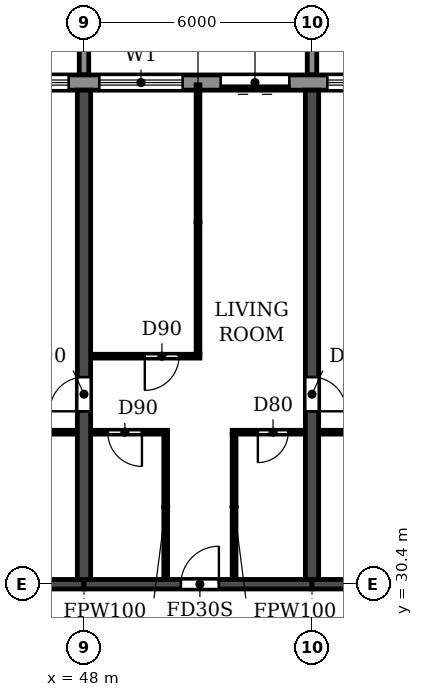
"""IFC4 building model, lengths in metres.
Left out: names, types, materials, properties, quantities, classifications, styles, units other than length and angle.
Written with IfcOpenShell. Run it as: python <this file> out.ifc"""

import sys

from ifc_helpers import new_model, si_unit, direction, frame, frame_2d, origin, place, context, subcontext, project, spatial, polyline, rectangle, outline, extrude, source, transform, mapped, element, fill, save


model = new_model("IFC4")
c1 = context("Model", 3, precision=1e-05, world=origin(), true_north=direction((0.0, 1.0)))
c2 = subcontext(c1, "Body", "Model", "MODEL_VIEW")
j1 = project(units=[si_unit("LENGTHUNIT", "METRE"), si_unit("PLANEANGLEUNIT", "RADIAN")], contexts=[c1])
p1 = place(None, origin())
s1 = spatial("IfcSite", under=j1, at=p1, CompositionType="ELEMENT")
p2 = place(p1, origin())
s2 = spatial("IfcBuilding", under=s1, at=p2, CompositionType="ELEMENT")
p3 = place(p2, frame((0.0, 0.0, 82.8)))
s3 = spatial("IfcBuildingStorey", under=s2, at=p3, CompositionType="ELEMENT", Elevation=82.8)
p4 = place(p3, frame((48.0, 30.525, 0.0), z_axis=(0.0, 0.0, 1.0), x_axis=(0.0, 1.0, 0.0)))
e1 = element("IfcWall", 1, at=p4, inside=s3, PredefinedType="SHEAR", context=c2, shape_type="SweptSolid", body=[
    extrude(rectangle(XDim=12.875, YDim=0.35, at=frame_2d((6.438, 0.0))), origin(), (0.0, 0.0, 1.0), 3.06),
])
p5 = place(p4, frame((4.425, 0.0, 0.0)))
e2 = element("IfcOpeningElement", 2, at=p5, cuts=e1, PredefinedType="OPENING", context=c2, shape_type="SweptSolid", body=[
    extrude(rectangle(XDim=0.9, YDim=2.1, at=frame_2d((0.45, 1.05))), frame((0.0, 0.185, 0.0), z_axis=(0.0, -1.0, 0.0), x_axis=(1.0, 0.0, 0.0)), (0.0, 0.0, 1.0), 0.37),
])
p6 = place(p3, frame((54.0, 30.525, 0.0), z_axis=(0.0, 0.0, 1.0), x_axis=(0.0, 1.0, 0.0)))
e3 = element("IfcWall", 3, at=p6, inside=s3, PredefinedType="SHEAR", context=c2, shape_type="SweptSolid", body=[
    extrude(rectangle(XDim=12.875, YDim=0.35, at=frame_2d((6.438, 0.0))), origin(), (0.0, 0.0, 1.0), 3.06),
])
p7 = place(p6, frame((4.425, 0.0, 0.0)))
e4 = element("IfcOpeningElement", 4, at=p7, cuts=e3, PredefinedType="OPENING", context=c2, shape_type="SweptSolid", body=[
    extrude(rectangle(XDim=0.9, YDim=2.1, at=frame_2d((0.45, 1.05))), frame((0.0, 0.185, 0.0), z_axis=(0.0, -1.0, 0.0), x_axis=(1.0, 0.0, 0.0)), (0.0, 0.0, 1.0), 0.37),
])
p8 = place(p3, frame((42.0, 30.4, 0.0), z_axis=(0.0, 0.0, 1.0), x_axis=(1.0, 0.0, 0.0)))
e5 = element("IfcWall", 5, at=p8, inside=s3, PredefinedType="SHEAR", context=c2, shape_type="SweptSolid", body=[
    extrude(rectangle(XDim=6.0, YDim=0.25, at=frame_2d((3.0, 0.0))), origin(), (0.0, 0.0, 1.0), 2.46),
])
p9 = place(p3, frame((48.0, 30.4, 0.0), z_axis=(0.0, 0.0, 1.0), x_axis=(1.0, 0.0, 0.0)))
e6 = element("IfcWall", 6, at=p9, inside=s3, PredefinedType="SHEAR", context=c2, shape_type="SweptSolid", body=[
    extrude(rectangle(XDim=6.0, YDim=0.25, at=frame_2d((3.0, 0.0))), origin(), (0.0, 0.0, 1.0), 2.46),
])
p10 = place(p9, frame((2.55, 0.0, 0.0)))
e7 = element("IfcOpeningElement", 7, at=p10, cuts=e6, PredefinedType="OPENING", context=c2, shape_type="SweptSolid", body=[
    extrude(rectangle(XDim=1.0, YDim=2.1, at=frame_2d((0.5, 1.05))), frame((0.0, 0.135, 0.0), z_axis=(0.0, -1.0, 0.0), x_axis=(1.0, 0.0, 0.0)), (0.0, 0.0, 1.0), 0.27),
])
p11 = place(p3, frame((54.0, 30.4, 0.0), z_axis=(0.0, 0.0, 1.0), x_axis=(1.0, 0.0, 0.0)))
e8 = element("IfcWall", 8, at=p11, inside=s3, PredefinedType="SHEAR", context=c2, shape_type="SweptSolid", body=[
    extrude(rectangle(XDim=6.0, YDim=0.25, at=frame_2d((3.0, 0.0))), origin(), (0.0, 0.0, 1.0), 2.46),
])
p12 = place(p3, frame((91.317, 43.6, 0.0), z_axis=(0.0, 0.0, 1.0), x_axis=(-1.0, 0.0, 0.0)))
e9 = element("IfcWall", 9, at=p12, inside=s3, PredefinedType="STANDARD", context=c2, shape_type="SweptSolid", body=[
    extrude(rectangle(XDim=80.634, YDim=0.4, at=frame_2d((40.317, 0.0))), origin(), (0.0, 0.0, 1.0), 3.06),
])
p13 = place(p12, frame((76.717, 0.0, 0.9)))
e10 = element("IfcOpeningElement", 10, at=p13, cuts=e9, PredefinedType="OPENING", context=c2, shape_type="SweptSolid", body=[
    extrude(rectangle(XDim=2.2, YDim=1.5, at=frame_2d((1.1, 0.75))), frame((0.0, 0.21, 0.0), z_axis=(0.0, -1.0, 0.0), x_axis=(1.0, 0.0, 0.0)), (0.0, 0.0, 1.0), 0.42),
])
p14 = place(p12, frame((73.917, 0.0, 0.0)))
e11 = element("IfcOpeningElement", 11, at=p14, cuts=e9, PredefinedType="OPENING", context=c2, shape_type="SweptSolid", body=[
    extrude(rectangle(XDim=1.8, YDim=2.4, at=frame_2d((0.9, 1.2))), frame((0.0, 0.21, 0.0), z_axis=(0.0, -1.0, 0.0), x_axis=(1.0, 0.0, 0.0)), (0.0, 0.0, 1.0), 0.42),
])
p15 = place(p12, frame((70.717, 0.0, 0.9)))
e12 = element("IfcOpeningElement", 12, at=p15, cuts=e9, PredefinedType="OPENING", context=c2, shape_type="SweptSolid", body=[
    extrude(rectangle(XDim=2.2, YDim=1.5, at=frame_2d((1.1, 0.75))), frame((0.0, 0.21, 0.0), z_axis=(0.0, -1.0, 0.0), x_axis=(1.0, 0.0, 0.0)), (0.0, 0.0, 1.0), 0.42),
])
p16 = place(p12, frame((67.717, 0.0, 0.9)))
e13 = element("IfcOpeningElement", 13, at=p16, cuts=e9, PredefinedType="OPENING", context=c2, shape_type="SweptSolid", body=[
    extrude(rectangle(XDim=2.2, YDim=1.5, at=frame_2d((1.1, 0.75))), frame((0.0, 0.21, 0.0), z_axis=(0.0, -1.0, 0.0), x_axis=(1.0, 0.0, 0.0)), (0.0, 0.0, 1.0), 0.42),
])
p17 = place(p12, frame((64.717, 0.0, 0.9)))
e14 = element("IfcOpeningElement", 14, at=p17, cuts=e9, PredefinedType="OPENING", context=c2, shape_type="SweptSolid", body=[
    extrude(rectangle(XDim=2.2, YDim=1.5, at=frame_2d((1.1, 0.75))), frame((0.0, 0.21, 0.0), z_axis=(0.0, -1.0, 0.0), x_axis=(1.0, 0.0, 0.0)), (0.0, 0.0, 1.0), 0.42),
])
p18 = place(p12, frame((61.917, 0.0, 0.0)))
e15 = element("IfcOpeningElement", 15, at=p18, cuts=e9, PredefinedType="OPENING", context=c2, shape_type="SweptSolid", body=[
    extrude(rectangle(XDim=1.8, YDim=2.4, at=frame_2d((0.9, 1.2))), frame((0.0, 0.21, 0.0), z_axis=(0.0, -1.0, 0.0), x_axis=(1.0, 0.0, 0.0)), (0.0, 0.0, 1.0), 0.42),
])
p19 = place(p12, frame((58.917, 0.0, 0.0)))
e16 = element("IfcOpeningElement", 16, at=p19, cuts=e9, PredefinedType="OPENING", context=c2, shape_type="SweptSolid", body=[
    extrude(rectangle(XDim=1.8, YDim=2.4, at=frame_2d((0.9, 1.2))), frame((0.0, 0.21, 0.0), z_axis=(0.0, -1.0, 0.0), x_axis=(1.0, 0.0, 0.0)), (0.0, 0.0, 1.0), 0.42),
])
p20 = place(p12, frame((55.717, 0.0, 0.9)))
e17 = element("IfcOpeningElement", 17, at=p20, cuts=e9, PredefinedType="OPENING", context=c2, shape_type="SweptSolid", body=[
    extrude(rectangle(XDim=2.2, YDim=1.5, at=frame_2d((1.1, 0.75))), frame((0.0, 0.21, 0.0), z_axis=(0.0, -1.0, 0.0), x_axis=(1.0, 0.0, 0.0)), (0.0, 0.0, 1.0), 0.42),
])
p21 = place(p12, frame((52.717, 0.0, 0.9)))
e18 = element("IfcOpeningElement", 18, at=p21, cuts=e9, PredefinedType="OPENING", context=c2, shape_type="SweptSolid", body=[
    extrude(rectangle(XDim=2.2, YDim=1.5, at=frame_2d((1.1, 0.75))), frame((0.0, 0.21, 0.0), z_axis=(0.0, -1.0, 0.0), x_axis=(1.0, 0.0, 0.0)), (0.0, 0.0, 1.0), 0.42),
])
p22 = place(p12, frame((49.917, 0.0, 0.0)))
e19 = element("IfcOpeningElement", 19, at=p22, cuts=e9, PredefinedType="OPENING", context=c2, shape_type="SweptSolid", body=[
    extrude(rectangle(XDim=1.8, YDim=2.4, at=frame_2d((0.9, 1.2))), frame((0.0, 0.21, 0.0), z_axis=(0.0, -1.0, 0.0), x_axis=(1.0, 0.0, 0.0)), (0.0, 0.0, 1.0), 0.42),
])
p23 = place(p12, frame((46.717, 0.0, 0.9)))
e20 = element("IfcOpeningElement", 20, at=p23, cuts=e9, PredefinedType="OPENING", context=c2, shape_type="SweptSolid", body=[
    extrude(rectangle(XDim=2.2, YDim=1.5, at=frame_2d((1.1, 0.75))), frame((0.0, 0.21, 0.0), z_axis=(0.0, -1.0, 0.0), x_axis=(1.0, 0.0, 0.0)), (0.0, 0.0, 1.0), 0.42),
])
p24 = place(p12, frame((43.717, 0.0, 0.9)))
e21 = element("IfcOpeningElement", 21, at=p24, cuts=e9, PredefinedType="OPENING", context=c2, shape_type="SweptSolid", body=[
    extrude(rectangle(XDim=2.2, YDim=1.5, at=frame_2d((1.1, 0.75))), frame((0.0, 0.21, 0.0), z_axis=(0.0, -1.0, 0.0), x_axis=(1.0, 0.0, 0.0)), (0.0, 0.0, 1.0), 0.42),
])
p25 = place(p12, frame((40.717, 0.0, 0.9)))
e22 = element("IfcOpeningElement", 22, at=p25, cuts=e9, PredefinedType="OPENING", context=c2, shape_type="SweptSolid", body=[
    extrude(rectangle(XDim=2.2, YDim=1.5, at=frame_2d((1.1, 0.75))), frame((0.0, 0.21, 0.0), z_axis=(0.0, -1.0, 0.0), x_axis=(1.0, 0.0, 0.0)), (0.0, 0.0, 1.0), 0.42),
])
p26 = place(p12, frame((37.917, 0.0, 0.0)))
e23 = element("IfcOpeningElement", 23, at=p26, cuts=e9, PredefinedType="OPENING", context=c2, shape_type="SweptSolid", body=[
    extrude(rectangle(XDim=1.8, YDim=2.4, at=frame_2d((0.9, 1.2))), frame((0.0, 0.21, 0.0), z_axis=(0.0, -1.0, 0.0), x_axis=(1.0, 0.0, 0.0)), (0.0, 0.0, 1.0), 0.42),
])
p27 = place(p12, frame((34.717, 0.0, 0.9)))
e24 = element("IfcOpeningElement", 24, at=p27, cuts=e9, PredefinedType="OPENING", context=c2, shape_type="SweptSolid", body=[
    extrude(rectangle(XDim=2.2, YDim=1.5, at=frame_2d((1.1, 0.75))), frame((0.0, 0.21, 0.0), z_axis=(0.0, -1.0, 0.0), x_axis=(1.0, 0.0, 0.0)), (0.0, 0.0, 1.0), 0.42),
])
p28 = place(p12, frame((31.717, 0.0, 0.9)))
e25 = element("IfcOpeningElement", 25, at=p28, cuts=e9, PredefinedType="OPENING", context=c2, shape_type="SweptSolid", body=[
    extrude(rectangle(XDim=2.2, YDim=1.5, at=frame_2d((1.1, 0.75))), frame((0.0, 0.21, 0.0), z_axis=(0.0, -1.0, 0.0), x_axis=(1.0, 0.0, 0.0)), (0.0, 0.0, 1.0), 0.42),
])
p29 = place(p12, frame((28.917, 0.0, 0.0)))
e26 = element("IfcOpeningElement", 26, at=p29, cuts=e9, PredefinedType="OPENING", context=c2, shape_type="SweptSolid", body=[
    extrude(rectangle(XDim=1.8, YDim=2.4, at=frame_2d((0.9, 1.2))), frame((0.0, 0.21, 0.0), z_axis=(0.0, -1.0, 0.0), x_axis=(1.0, 0.0, 0.0)), (0.0, 0.0, 1.0), 0.42),
])
p30 = place(p12, frame((25.717, 0.0, 0.9)))
e27 = element("IfcOpeningElement", 27, at=p30, cuts=e9, PredefinedType="OPENING", context=c2, shape_type="SweptSolid", body=[
    extrude(rectangle(XDim=2.2, YDim=1.5, at=frame_2d((1.1, 0.75))), frame((0.0, 0.21, 0.0), z_axis=(0.0, -1.0, 0.0), x_axis=(1.0, 0.0, 0.0)), (0.0, 0.0, 1.0), 0.42),
])
p31 = place(p12, frame((22.717, 0.0, 0.9)))
e28 = element("IfcOpeningElement", 28, at=p31, cuts=e9, PredefinedType="OPENING", context=c2, shape_type="SweptSolid", body=[
    extrude(rectangle(XDim=2.2, YDim=1.5, at=frame_2d((1.1, 0.75))), frame((0.0, 0.21, 0.0), z_axis=(0.0, -1.0, 0.0), x_axis=(1.0, 0.0, 0.0)), (0.0, 0.0, 1.0), 0.42),
])
p32 = place(p12, frame((19.717, 0.0, 0.9)))
e29 = element("IfcOpeningElement", 29, at=p32, cuts=e9, PredefinedType="OPENING", context=c2, shape_type="SweptSolid", body=[
    extrude(rectangle(XDim=2.2, YDim=1.5, at=frame_2d((1.1, 0.75))), frame((0.0, 0.21, 0.0), z_axis=(0.0, -1.0, 0.0), x_axis=(1.0, 0.0, 0.0)), (0.0, 0.0, 1.0), 0.42),
])
p33 = place(p12, frame((16.717, 0.0, 0.9)))
e30 = element("IfcOpeningElement", 30, at=p33, cuts=e9, PredefinedType="OPENING", context=c2, shape_type="SweptSolid", body=[
    extrude(rectangle(XDim=2.2, YDim=1.5, at=frame_2d((1.1, 0.75))), frame((0.0, 0.21, 0.0), z_axis=(0.0, -1.0, 0.0), x_axis=(1.0, 0.0, 0.0)), (0.0, 0.0, 1.0), 0.42),
])
p34 = place(p12, frame((13.917, 0.0, 0.0)))
e31 = element("IfcOpeningElement", 31, at=p34, cuts=e9, PredefinedType="OPENING", context=c2, shape_type="SweptSolid", body=[
    extrude(rectangle(XDim=1.8, YDim=2.4, at=frame_2d((0.9, 1.2))), frame((0.0, 0.21, 0.0), z_axis=(0.0, -1.0, 0.0), x_axis=(1.0, 0.0, 0.0)), (0.0, 0.0, 1.0), 0.42),
])
p35 = place(p12, frame((10.717, 0.0, 0.9)))
e32 = element("IfcOpeningElement", 32, at=p35, cuts=e9, PredefinedType="OPENING", context=c2, shape_type="SweptSolid", body=[
    extrude(rectangle(XDim=2.2, YDim=1.5, at=frame_2d((1.1, 0.75))), frame((0.0, 0.21, 0.0), z_axis=(0.0, -1.0, 0.0), x_axis=(1.0, 0.0, 0.0)), (0.0, 0.0, 1.0), 0.42),
])
p36 = place(p12, frame((7.717, 0.0, 0.9)))
e33 = element("IfcOpeningElement", 33, at=p36, cuts=e9, PredefinedType="OPENING", context=c2, shape_type="SweptSolid", body=[
    extrude(rectangle(XDim=2.2, YDim=1.5, at=frame_2d((1.1, 0.75))), frame((0.0, 0.21, 0.0), z_axis=(0.0, -1.0, 0.0), x_axis=(1.0, 0.0, 0.0)), (0.0, 0.0, 1.0), 0.42),
])
p37 = place(p12, frame((4.917, 0.0, 0.0)))
e34 = element("IfcOpeningElement", 34, at=p37, cuts=e9, PredefinedType="OPENING", context=c2, shape_type="SweptSolid", body=[
    extrude(rectangle(XDim=1.8, YDim=2.4, at=frame_2d((0.9, 1.2))), frame((0.0, 0.21, 0.0), z_axis=(0.0, -1.0, 0.0), x_axis=(1.0, 0.0, 0.0)), (0.0, 0.0, 1.0), 0.42),
])
p38 = place(p12, frame((1.717, 0.0, 0.9)))
e35 = element("IfcOpeningElement", 35, at=p38, cuts=e9, PredefinedType="OPENING", context=c2, shape_type="SweptSolid", body=[
    extrude(rectangle(XDim=2.2, YDim=1.5, at=frame_2d((1.1, 0.75))), frame((0.0, 0.21, 0.0), z_axis=(0.0, -1.0, 0.0), x_axis=(1.0, 0.0, 0.0)), (0.0, 0.0, 1.0), 0.42),
])
m1 = source(origin(), c2, "Body", "SweptSolid", [
    extrude(outline(polyline([(0.0, 0.0), (0.25, 0.0), (0.25, 3.1), (0.0, 3.1), (0.0, 0.0)])), origin(), (0.0, 0.0, 1.0), 3.1),
])
for number, where in (
    (36, (47.875, 43.8, 0.0)),
    (37, (53.875, 43.8, 0.0)),
):
    element("IfcWall", number, at=place(p3, frame(where)), inside=s3, PredefinedType="STANDARD", context=c2, shape_type="MappedRepresentation", body=[
        mapped(m1, transform((0.0, 0.0, 0.0))),
    ])
p39 = place(p3, frame((45.1, 34.4, 0.0), z_axis=(0.0, 0.0, 1.0), x_axis=(1.0, 0.0, 0.0)))
e38 = element("IfcWall", 38, at=p39, inside=s3, PredefinedType="PARTITIONING", context=c2, shape_type="SweptSolid", body=[
    extrude(rectangle(XDim=2.715, YDim=0.1, at=frame_2d((1.357, 0.0))), origin(), (0.0, 0.0, 1.0), 3.06),
])
p40 = place(p39, frame((1.0, 0.0, 0.0)))
e39 = element("IfcOpeningElement", 39, at=p40, cuts=e38, PredefinedType="OPENING", context=c2, shape_type="SweptSolid", body=[
    extrude(rectangle(XDim=0.8, YDim=2.1, at=frame_2d((0.4, 1.05))), frame((0.0, 0.06, 0.0), z_axis=(0.0, -1.0, 0.0), x_axis=(1.0, 0.0, 0.0)), (0.0, 0.0, 1.0), 0.12),
])
p41 = place(p3, frame((48.185, 34.4, 0.0), z_axis=(0.0, 0.0, 1.0), x_axis=(1.0, 0.0, 0.0)))
e40 = element("IfcWall", 40, at=p41, inside=s3, PredefinedType="PARTITIONING", context=c2, shape_type="SweptSolid", body=[
    extrude(rectangle(XDim=2.015, YDim=0.1, at=frame_2d((1.007, 0.0))), origin(), (0.0, 0.0, 1.0), 3.06),
])
p42 = place(p41, frame((0.44, 0.0, 0.0)))
e41 = element("IfcOpeningElement", 41, at=p42, cuts=e40, PredefinedType="OPENING", context=c2, shape_type="SweptSolid", body=[
    extrude(rectangle(XDim=0.9, YDim=2.1, at=frame_2d((0.45, 1.05))), frame((0.0, 0.06, 0.0), z_axis=(0.0, -1.0, 0.0), x_axis=(1.0, 0.0, 0.0)), (0.0, 0.0, 1.0), 0.12),
])
p43 = place(p3, frame((51.9, 34.4, 0.0), z_axis=(0.0, 0.0, 1.0), x_axis=(1.0, 0.0, 0.0)))
e42 = element("IfcWall", 42, at=p43, inside=s3, PredefinedType="PARTITIONING", context=c2, shape_type="SweptSolid", body=[
    extrude(rectangle(XDim=1.915, YDim=0.1, at=frame_2d((0.958, 0.0))), origin(), (0.0, 0.0, 1.0), 3.06),
])
p44 = place(p43, frame((0.675, 0.0, 0.0)))
e43 = element("IfcOpeningElement", 43, at=p44, cuts=e42, PredefinedType="OPENING", context=c2, shape_type="SweptSolid", body=[
    extrude(rectangle(XDim=0.8, YDim=2.1, at=frame_2d((0.4, 1.05))), frame((0.0, 0.06, 0.0), z_axis=(0.0, -1.0, 0.0), x_axis=(1.0, 0.0, 0.0)), (0.0, 0.0, 1.0), 0.12),
])
p45 = place(p3, frame((54.185, 34.4, 0.0), z_axis=(0.0, 0.0, 1.0), x_axis=(1.0, 0.0, 0.0)))
e44 = element("IfcWall", 44, at=p45, inside=s3, PredefinedType="PARTITIONING", context=c2, shape_type="SweptSolid", body=[
    extrude(rectangle(XDim=2.715, YDim=0.1, at=frame_2d((1.357, 0.0))), origin(), (0.0, 0.0, 1.0), 3.06),
])
p46 = place(p45, frame((0.915, 0.0, 0.0)))
e45 = element("IfcOpeningElement", 45, at=p46, cuts=e44, PredefinedType="OPENING", context=c2, shape_type="SweptSolid", body=[
    extrude(rectangle(XDim=0.8, YDim=2.1, at=frame_2d((0.4, 1.05))), frame((0.0, 0.06, 0.0), z_axis=(0.0, -1.0, 0.0), x_axis=(1.0, 0.0, 0.0)), (0.0, 0.0, 1.0), 0.12),
])
p47 = place(p3, frame((48.185, 36.4, 0.0), z_axis=(0.0, 0.0, 1.0), x_axis=(1.0, 0.0, 0.0)))
e46 = element("IfcWall", 46, at=p47, inside=s3, PredefinedType="PARTITIONING", context=c2, shape_type="SweptSolid", body=[
    extrude(rectangle(XDim=2.865, YDim=0.1, at=frame_2d((1.433, 0.0))), origin(), (0.0, 0.0, 1.0), 3.06),
])
p48 = place(p47, frame((1.415, 0.0, 0.0)))
e47 = element("IfcOpeningElement", 47, at=p48, cuts=e46, PredefinedType="OPENING", context=c2, shape_type="SweptSolid", body=[
    extrude(rectangle(XDim=0.9, YDim=2.1, at=frame_2d((0.45, 1.05))), frame((0.0, 0.06, 0.0), z_axis=(0.0, -1.0, 0.0), x_axis=(1.0, 0.0, 0.0)), (0.0, 0.0, 1.0), 0.12),
])
p49 = place(p3, frame((50.15, 30.535, 0.0), z_axis=(0.0, 0.0, 1.0), x_axis=(0.0, 1.0, 0.0)))
e48 = element("IfcWall", 48, at=p49, inside=s3, PredefinedType="PARTITIONING", context=c2, shape_type="SweptSolid", body=[
    extrude(rectangle(XDim=3.815, YDim=0.1, at=frame_2d((1.908, 0.0))), origin(), (0.0, 0.0, 1.0), 3.06),
])
p50 = place(p3, frame((51.0, 36.45, 0.0), z_axis=(0.0, 0.0, 1.0), x_axis=(0.0, 1.0, 0.0)))
e49 = element("IfcWall", 49, at=p50, inside=s3, PredefinedType="PARTITIONING", context=c2, shape_type="SweptSolid", body=[
    extrude(rectangle(XDim=7.09, YDim=0.1, at=frame_2d((3.545, 0.0))), origin(), (0.0, 0.0, 1.0), 3.06),
])
p51 = place(p3, frame((51.95, 30.535, 0.0), z_axis=(0.0, 0.0, 1.0), x_axis=(0.0, 1.0, 0.0)))
e50 = element("IfcWall", 50, at=p51, inside=s3, PredefinedType="PARTITIONING", context=c2, shape_type="SweptSolid", body=[
    extrude(rectangle(XDim=3.815, YDim=0.1, at=frame_2d((1.908, 0.0))), origin(), (0.0, 0.0, 1.0), 3.06),
])
p52 = place(p24, origin())
e51 = element("IfcWindow", 51, at=p52, inside=s3, PartitioningType="DOUBLE_PANEL_HORIZONTAL", PredefinedType="WINDOW", context=c2, shape_type="SweptSolid", body=[
    extrude(rectangle(XDim=2.2, YDim=1.5, at=frame_2d((1.1, 0.75))), frame((0.0, 0.03, 0.0), z_axis=(0.0, -1.0, 0.0), x_axis=(1.0, 0.0, 0.0)), (0.0, 0.0, 1.0), 0.06),
])
fill(e21, e51)
p53 = place(p25, origin())
e52 = element("IfcWindow", 52, at=p53, inside=s3, PartitioningType="DOUBLE_PANEL_HORIZONTAL", PredefinedType="WINDOW", context=c2, shape_type="SweptSolid", body=[
    extrude(rectangle(XDim=2.2, YDim=1.5, at=frame_2d((1.1, 0.75))), frame((0.0, 0.03, 0.0), z_axis=(0.0, -1.0, 0.0), x_axis=(1.0, 0.0, 0.0)), (0.0, 0.0, 1.0), 0.06),
])
fill(e22, e52)
p54 = place(p26, origin())
e53 = element("IfcDoor", 53, at=p54, inside=s3, OperationType="DOUBLE_DOOR_SLIDING", PredefinedType="DOOR", context=c2, shape_type="SweptSolid", body=[
    extrude(rectangle(XDim=1.8, YDim=2.4, at=frame_2d((0.9, 1.2))), frame((0.0, 0.025, 0.0), z_axis=(0.0, -1.0, 0.0), x_axis=(1.0, 0.0, 0.0)), (0.0, 0.0, 1.0), 0.05),
])
fill(e23, e53)
p55 = place(p27, origin())
e54 = element("IfcWindow", 54, at=p55, inside=s3, PartitioningType="DOUBLE_PANEL_HORIZONTAL", PredefinedType="WINDOW", context=c2, shape_type="SweptSolid", body=[
    extrude(rectangle(XDim=2.2, YDim=1.5, at=frame_2d((1.1, 0.75))), frame((0.0, 0.03, 0.0), z_axis=(0.0, -1.0, 0.0), x_axis=(1.0, 0.0, 0.0)), (0.0, 0.0, 1.0), 0.06),
])
fill(e24, e54)
p56 = place(p5, origin())
e55 = element("IfcDoor", 55, at=p56, inside=s3, OperationType="SINGLE_SWING_LEFT", PredefinedType="DOOR", context=c2, shape_type="SweptSolid", body=[
    extrude(rectangle(XDim=0.9, YDim=2.1, at=frame_2d((0.45, 1.05))), frame((0.0, 0.025, 0.0), z_axis=(0.0, -1.0, 0.0), x_axis=(1.0, 0.0, 0.0)), (0.0, 0.0, 1.0), 0.05),
])
fill(e2, e55)
p57 = place(p42, frame((0.9, 0.0, 0.0), z_axis=(0.0, 0.0, 1.0), x_axis=(-1.0, 0.0, 0.0)))
e56 = element("IfcDoor", 56, at=p57, inside=s3, OperationType="SINGLE_SWING_LEFT", PredefinedType="DOOR", context=c2, shape_type="SweptSolid", body=[
    extrude(rectangle(XDim=0.9, YDim=2.1, at=frame_2d((0.45, 1.05))), frame((0.0, 0.025, 0.0), z_axis=(0.0, -1.0, 0.0), x_axis=(1.0, 0.0, 0.0)), (0.0, 0.0, 1.0), 0.05),
])
fill(e41, e56)
p58 = place(p48, frame((0.9, 0.0, 0.0), z_axis=(0.0, 0.0, 1.0), x_axis=(-1.0, 0.0, 0.0)))
e57 = element("IfcDoor", 57, at=p58, inside=s3, OperationType="SINGLE_SWING_RIGHT", PredefinedType="DOOR", context=c2, shape_type="SweptSolid", body=[
    extrude(rectangle(XDim=0.9, YDim=2.1, at=frame_2d((0.45, 1.05))), frame((0.0, 0.025, 0.0), z_axis=(0.0, -1.0, 0.0), x_axis=(1.0, 0.0, 0.0)), (0.0, 0.0, 1.0), 0.05),
])
fill(e47, e57)
p59 = place(p10, origin())
e58 = element("IfcDoor", 58, at=p59, inside=s3, OperationType="SINGLE_SWING_RIGHT", PredefinedType="DOOR", context=c2, shape_type="SweptSolid", body=[
    extrude(rectangle(XDim=1.0, YDim=2.1, at=frame_2d((0.5, 1.05))), frame((0.0, 0.025, 0.0), z_axis=(0.0, -1.0, 0.0), x_axis=(1.0, 0.0, 0.0)), (0.0, 0.0, 1.0), 0.05),
])
fill(e7, e58)
p60 = place(p44, frame((0.8, 0.0, 0.0), z_axis=(0.0, 0.0, 1.0), x_axis=(-1.0, 0.0, 0.0)))
e59 = element("IfcDoor", 59, at=p60, inside=s3, OperationType="SINGLE_SWING_RIGHT", PredefinedType="DOOR", context=c2, shape_type="SweptSolid", body=[
    extrude(rectangle(XDim=0.8, YDim=2.1, at=frame_2d((0.4, 1.05))), frame((0.0, 0.025, 0.0), z_axis=(0.0, -1.0, 0.0), x_axis=(1.0, 0.0, 0.0)), (0.0, 0.0, 1.0), 0.05),
])
fill(e43, e59)
p61 = place(p7, frame((0.9, 0.0, 0.0), z_axis=(0.0, 0.0, 1.0), x_axis=(-1.0, 0.0, 0.0)))
e60 = element("IfcDoor", 60, at=p61, inside=s3, OperationType="SINGLE_SWING_RIGHT", PredefinedType="DOOR", context=c2, shape_type="SweptSolid", body=[
    extrude(rectangle(XDim=0.9, YDim=2.1, at=frame_2d((0.45, 1.05))), frame((0.0, 0.025, 0.0), z_axis=(0.0, -1.0, 0.0), x_axis=(1.0, 0.0, 0.0)), (0.0, 0.0, 1.0), 0.05),
])
fill(e4, e60)
save(model, sys.argv[1])
